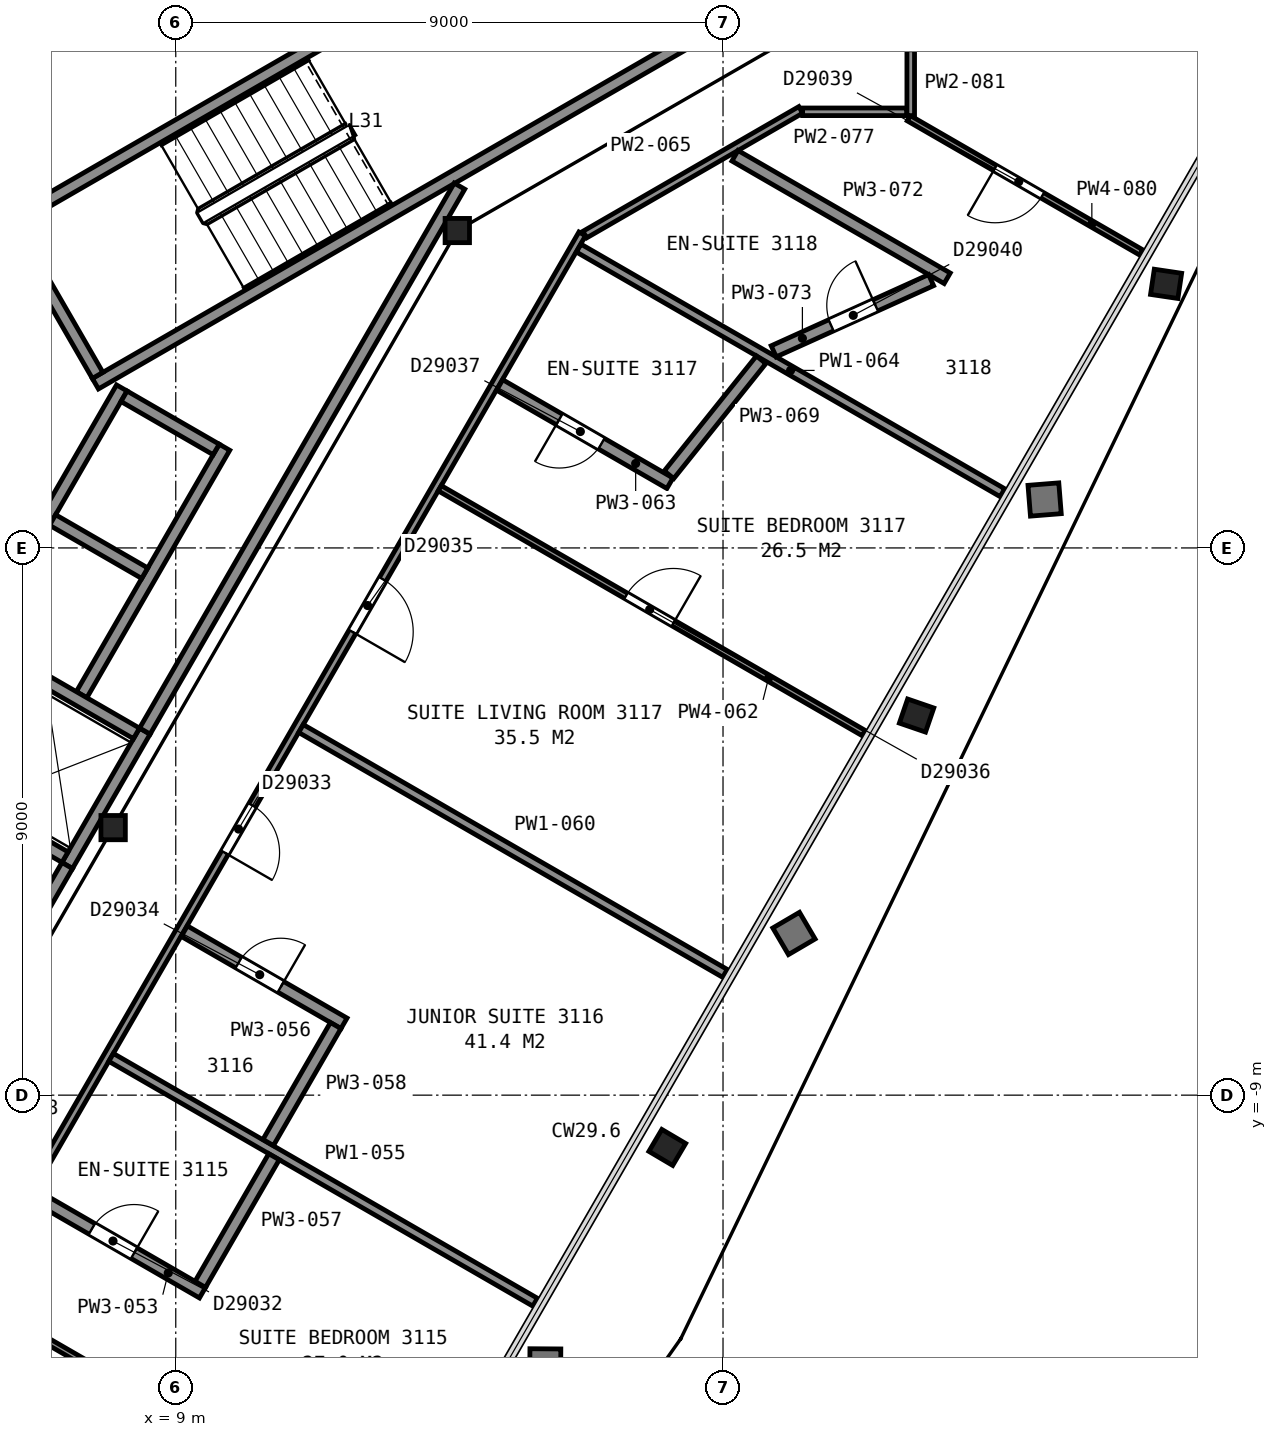
"""IFC4 building model, lengths in metres.
Left out: names, types, materials, properties, quantities, classifications, styles, units other than length and angle.
Written with IfcOpenShell. Run it as: python <this file> out.ifc"""

import sys

from ifc_helpers import new_model, si_unit, direction, frame, frame_2d, origin, origin_2d, place, context, subcontext, project, spatial, rectangle, i_section, extrude, element, fill, save


model = new_model("IFC4")
c1 = context("Model", 3, precision=1e-05, world=origin(), true_north=direction((0.0, 1.0)))
c2 = subcontext(c1, "Body", "Model", "MODEL_VIEW")
j1 = project(units=[si_unit("LENGTHUNIT", "METRE"), si_unit("PLANEANGLEUNIT", "RADIAN")], contexts=[c1])
p1 = place(None, origin())
s1 = spatial("IfcSite", under=j1, at=p1, CompositionType="ELEMENT")
p2 = place(p1, origin())
s2 = spatial("IfcBuilding", under=s1, at=p2, CompositionType="ELEMENT")
p3 = place(p2, frame((0.0, 0.0, 128.8)))
s3 = spatial("IfcBuildingStorey", under=s2, at=p3, CompositionType="ELEMENT", Elevation=128.8)
p4 = place(p3, frame((16.886, -9.743, 0.035), z_axis=(0.166257050151, -0.0981255896, 0.981188035975), x_axis=(-0.500024449769, -0.866009245638, -0.001880452815)))
e1 = element("IfcColumn", 1, at=p4, inside=s3, PredefinedType="COLUMN", context=c2, shape_type="SweptSolid", body=[
    extrude(i_section(OverallWidth=0.419, OverallDepth=0.455, WebThickness=0.042, FlangeThickness=0.068, FilletRadius=0.015, at=origin_2d()), origin(), (0.0, 0.0, 1.0), 3.598),
])
p5 = place(p3, frame((20.967, -2.683, 0.04), z_axis=(0.18265232026, -0.062676150134, 0.981177777015), x_axis=(-0.499535766842, -0.865472257466, 0.037706620133)))
e2 = element("IfcColumn", 2, at=p5, inside=s3, PredefinedType="COLUMN", context=c2, shape_type="SweptSolid", body=[
    extrude(i_section(OverallWidth=0.419, OverallDepth=0.455, WebThickness=0.042, FlangeThickness=0.068, FilletRadius=0.015, at=origin_2d()), origin(), (0.0, 0.0, 1.0), 3.588),
])
p6 = place(p3, frame((25.048, 4.379, 0.04), z_axis=(0.201275064079, -0.029946795971, 0.979076880531), x_axis=(-0.498664123801, -0.863447944319, 0.076103476176)))
e3 = element("IfcColumn", 3, at=p6, inside=s3, PredefinedType="COLUMN", context=c2, shape_type="SweptSolid", body=[
    extrude(i_section(OverallWidth=0.419, OverallDepth=0.455, WebThickness=0.042, FlangeThickness=0.068, FilletRadius=0.015, at=origin_2d()), origin(), (0.0, 0.0, 1.0), 3.595),
])
for number, where, z_axis, x_axis in (
    (4, (13.63, 5.22, 0.0), (0.0, 0.0, 1.0), (1.0, 0.0, 0.0)),
    (5, (7.97, -4.6, 0.0), (0.0, 0.0, 1.0), (1.0, 0.0, 0.0)),
):
    element("IfcColumn", number, at=place(p3, frame(where, z_axis=z_axis, x_axis=x_axis)), inside=s3, PredefinedType="COLUMN", context=c2, shape_type="SweptSolid", body=[
        extrude(i_section(OverallWidth=0.401, OverallDepth=0.399, WebThickness=0.025, FlangeThickness=0.04, FilletRadius=0.015, at=origin_2d()), origin(), (0.0, 0.0, 1.0), 3.6),
    ])
for number, where, z_axis, x_axis in (
    (6, (6.178, 5.299, 0.0), (0.0, 0.0, 1.0), (0.866, 0.5, 0.0)),
    (7, (7.678, 2.701, 0.0), (0.0, 0.0, 1.0), (0.866, 0.5, 0.0)),
):
    element("IfcWall", number, at=place(p3, frame(where, z_axis=z_axis, x_axis=x_axis)), inside=s3, PredefinedType="PARTITIONING", context=c2, shape_type="SweptSolid", body=[
        extrude(rectangle(XDim=12.0, YDim=0.2, at=frame_2d((6.0, 0.0))), origin(), (0.0, 0.0, 1.0), 3.35),
    ])
p7 = place(p3, frame((7.715, 2.838, 0.0), z_axis=(0.0, 0.0, 1.0), x_axis=(-0.500049511043, 0.865996816683, 0.0)))
e8 = element("IfcWall", 8, at=p7, inside=s3, PredefinedType="PARTITIONING", context=c2, shape_type="SweptSolid", body=[
    extrude(rectangle(XDim=2.8, YDim=0.2, at=frame_2d((1.4, 0.0))), origin(), (0.0, 0.0, 1.0), 3.35),
])
p8 = place(p3, frame((7.216, -5.222, 0.0), z_axis=(0.0, 0.0, 1.0), x_axis=(0.499990435942, 0.866030925526, 0.0)))
e9 = element("IfcWall", 9, at=p8, inside=s3, PredefinedType="PARTITIONING", context=c2, shape_type="SweptSolid", body=[
    extrude(rectangle(XDim=2.55, YDim=0.2, at=frame_2d((1.275, 0.0))), origin(), (0.0, 0.0, 1.0), 3.6),
])
p9 = place(p3, frame((7.451, -2.414, 0.0), z_axis=(0.0, 0.0, 1.0), x_axis=(0.500016218704, 0.866016039709, 0.0)))
e10 = element("IfcWall", 10, at=p9, inside=s3, PredefinedType="PARTITIONING", context=c2, shape_type="SweptSolid", body=[
    extrude(rectangle(XDim=4.7, YDim=0.2, at=frame_2d((2.35, 0.0))), origin(), (0.0, 0.0, 1.0), 3.6),
])
p10 = place(p3, frame((5.663, -1.612, 0.0), z_axis=(0.0, 0.0, 1.0), x_axis=(0.49998122708, 0.866036242063, 0.0)))
e11 = element("IfcWall", 11, at=p10, inside=s3, PredefinedType="PARTITIONING", context=c2, shape_type="SweptSolid", body=[
    extrude(rectangle(XDim=4.9, YDim=0.2, at=frame_2d((2.45, 0.0))), origin(), (0.0, 0.0, 1.0), 3.6),
])
p11 = place(p3, frame((9.665, 1.62, 0.0), z_axis=(0.0, 0.0, 1.0), x_axis=(-0.866002029911, 0.500040482552, 0.0)))
e12 = element("IfcWall", 12, at=p11, inside=s3, PredefinedType="PARTITIONING", context=c2, shape_type="SweptSolid", body=[
    extrude(rectangle(XDim=1.75, YDim=0.2, at=frame_2d((0.875, 0.0))), origin(), (0.0, 0.0, 1.0), 3.6),
])
p12 = place(p3, frame((8.49, -0.416, 0.0), z_axis=(0.0, 0.0, 1.0), x_axis=(-0.866036909293, 0.499980071345, 0.0)))
e13 = element("IfcWall", 13, at=p12, inside=s3, PredefinedType="PARTITIONING", context=c2, shape_type="SweptSolid", body=[
    extrude(rectangle(XDim=1.75, YDim=0.2, at=frame_2d((0.875, 0.0))), origin(), (0.0, 0.0, 1.0), 3.6),
])
p13 = place(p3, frame((8.354, -3.051, 0.0), z_axis=(0.0, 0.0, 1.0), x_axis=(-0.866060182126, 0.499939757307, 0.0)))
e14 = element("IfcWall", 14, at=p13, inside=s3, PredefinedType="PARTITIONING", context=c2, shape_type="SweptSolid", body=[
    extrude(rectangle(XDim=2.95, YDim=0.2, at=frame_2d((1.475, 0.0))), origin(), (0.0, 0.0, 1.0), 3.6),
])
p14 = place(p3, frame((7.179, -5.086, 0.0), z_axis=(0.0, 0.0, 1.0), x_axis=(-0.866036909293, 0.499980071345, 0.0)))
e15 = element("IfcWall", 15, at=p14, inside=s3, PredefinedType="PARTITIONING", context=c2, shape_type="SweptSolid", body=[
    extrude(rectangle(XDim=1.75, YDim=0.2, at=frame_2d((0.875, 0.0))), origin(), (0.0, 0.0, 1.0), 3.6),
])
p15 = place(p3, frame((5.906, -7.49, 0.0), z_axis=(0.0, 0.0, 1.0), x_axis=(0.500252727967, 0.865879442048, 0.0)))
e16 = element("IfcWall", 16, at=p15, inside=s3, PredefinedType="PARTITIONING", context=c2, shape_type="SweptSolid", body=[
    extrude(rectangle(XDim=2.617, YDim=0.2, at=frame_2d((1.309, 0.0))), origin(), (0.0, 0.0, 1.0), 3.35),
])
p16 = place(p3, frame((8.492, -3.012, 0.0), z_axis=(0.0, 0.0, 1.0), x_axis=(0.499972957231, 0.866041016371, 0.0)))
e17 = element("IfcWall", 17, at=p16, inside=s3, PredefinedType="PARTITIONING", context=c2, shape_type="SweptSolid", body=[
    extrude(rectangle(XDim=10.349, YDim=0.2, at=frame_2d((5.174, 0.0))), origin(), (0.0, 0.0, 1.0), 3.35),
])
p17 = place(p3, frame((15.684, 5.165, 0.0), z_axis=(0.0, 0.0, 1.0), x_axis=(-0.500027787016, -0.866009360349, 0.0)))
e18 = element("IfcWall", 18, at=p17, inside=s3, PredefinedType="PARTITIONING", context=c2, shape_type="SweptSolid", body=[
    extrude(rectangle(XDim=23.856, YDim=0.125, at=frame_2d((11.928, 0.0))), origin(), (0.0, 0.0, 1.0), 2.613),
])
p18 = place(p17, frame((21.493, 0.0, 0.0)))
e19 = element("IfcOpeningElement", 19, at=p18, cuts=e18, PredefinedType="OPENING", context=c2, shape_type="SweptSolid", body=[
    extrude(rectangle(XDim=1.0, YDim=2.1, at=frame_2d((0.5, 1.05))), frame((0.0, 0.073, 0.0), z_axis=(0.0, -1.0, 0.0), x_axis=(1.0, 0.0, 0.0)), (0.0, 0.0, 1.0), 0.145),
])
p19 = place(p17, frame((10.853, 0.0, 0.0)))
e20 = element("IfcOpeningElement", 20, at=p19, cuts=e18, PredefinedType="OPENING", context=c2, shape_type="SweptSolid", body=[
    extrude(rectangle(XDim=0.9, YDim=2.1, at=frame_2d((0.45, 1.05))), frame((0.0, 0.073, 0.0), z_axis=(0.0, -1.0, 0.0), x_axis=(1.0, 0.0, 0.0)), (0.0, 0.0, 1.0), 0.145),
])
p20 = place(p17, frame((6.558, 0.0, 0.0)))
e21 = element("IfcOpeningElement", 21, at=p20, cuts=e18, PredefinedType="OPENING", context=c2, shape_type="SweptSolid", body=[
    extrude(rectangle(XDim=1.0, YDim=2.1, at=frame_2d((0.5, 1.05))), frame((0.0, 0.073, 0.0), z_axis=(0.0, -1.0, 0.0), x_axis=(1.0, 0.0, 0.0)), (0.0, 0.0, 1.0), 0.145),
])
p21 = place(p3, frame((5.654, -12.331, 0.0), z_axis=(0.0, 0.0, 1.0), x_axis=(0.866051796338, -0.49995428397, 0.0)))
e22 = element("IfcWall", 22, at=p21, inside=s3, PredefinedType="PARTITIONING", context=c2, shape_type="SweptSolid", body=[
    extrude(rectangle(XDim=8.052, YDim=0.1, at=frame_2d((4.026, 0.0))), origin(), (0.0, 0.0, 1.0), 2.613),
])
p22 = place(p21, frame((3.538, 0.0, 0.0)))
e23 = element("IfcOpeningElement", 23, at=p22, cuts=e22, PredefinedType="OPENING", context=c2, shape_type="SweptSolid", body=[
    extrude(rectangle(XDim=0.9, YDim=2.1, at=frame_2d((0.45, 1.05))), frame((0.0, 0.06, 0.0), z_axis=(0.0, -1.0, 0.0), x_axis=(1.0, 0.0, 0.0)), (0.0, 0.0, 1.0), 0.12),
])
p23 = place(p3, frame((6.64, -10.633, 0.0), z_axis=(0.0, 0.0, 1.0), x_axis=(0.866022073929, -0.500005767435, 0.0)))
e24 = element("IfcWall", 24, at=p23, inside=s3, PredefinedType="PARTITIONING", context=c2, shape_type="SweptSolid", body=[
    extrude(rectangle(XDim=3.232, YDim=0.2, at=frame_2d((1.616, 0.0))), origin(), (0.0, 0.0, 1.0), 2.613),
])
p24 = place(p23, frame((1.133, 0.0, 0.0)))
e25 = element("IfcOpeningElement", 25, at=p24, cuts=e24, PredefinedType="OPENING", context=c2, shape_type="SweptSolid", body=[
    extrude(rectangle(XDim=0.8, YDim=2.1, at=frame_2d((0.4, 1.05))), frame((0.0, 0.11, 0.0), z_axis=(0.0, -1.0, 0.0), x_axis=(1.0, 0.0, 0.0)), (0.0, 0.0, 1.0), 0.22),
])
p25 = place(p3, frame((7.936, -8.379, 0.0), z_axis=(0.0, 0.0, 1.0), x_axis=(0.866044217767, -0.499967411811, 0.0)))
e26 = element("IfcWall", 26, at=p25, inside=s3, PredefinedType="PARTITIONING", context=c2, shape_type="SweptSolid", body=[
    extrude(rectangle(XDim=8.052, YDim=0.15, at=frame_2d((4.026, 0.0))), origin(), (0.0, 0.0, 1.0), 2.613),
])
p26 = place(p3, frame((11.767, -7.819, 0.0), z_axis=(0.0, 0.0, 1.0), x_axis=(-0.866009954834, 0.500026757412, 0.0)))
e27 = element("IfcWall", 27, at=p26, inside=s3, PredefinedType="PARTITIONING", context=c2, shape_type="SweptSolid", body=[
    extrude(rectangle(XDim=3.032, YDim=0.2, at=frame_2d((1.516, 0.0))), origin(), (0.0, 0.0, 1.0), 2.613),
])
p27 = place(p26, frame((1.2, 0.0, 0.0)))
e28 = element("IfcOpeningElement", 28, at=p27, cuts=e27, PredefinedType="OPENING", context=c2, shape_type="SweptSolid", body=[
    extrude(rectangle(XDim=0.8, YDim=2.1, at=frame_2d((0.4, 1.05))), frame((0.0, 0.11, 0.0), z_axis=(0.0, -1.0, 0.0), x_axis=(1.0, 0.0, 0.0)), (0.0, 0.0, 1.0), 0.22),
])
p28 = place(p3, frame((9.403, -12.112, 0.0), z_axis=(0.0, 0.0, 1.0), x_axis=(0.500103096288, 0.865965872932, 0.0)))
e29 = element("IfcWall", 29, at=p28, inside=s3, PredefinedType="PARTITIONING", context=c2, shape_type="SweptSolid", body=[
    extrude(rectangle(XDim=2.424, YDim=0.2, at=frame_2d((1.212, 0.0))), origin(), (0.0, 0.0, 1.0), 2.613),
])
p29 = place(p3, frame((10.52, -9.779, 0.0), z_axis=(0.0, 0.0, 1.0), x_axis=(0.499935013329, 0.866062920605, 0.0)))
e30 = element("IfcWall", 30, at=p29, inside=s3, PredefinedType="PARTITIONING", context=c2, shape_type="SweptSolid", body=[
    extrude(rectangle(XDim=2.22, YDim=0.2, at=frame_2d((1.11, 0.0))), origin(), (0.0, 0.0, 1.0), 2.613),
])
p30 = place(p3, frame((11.059, -2.97, 0.0), z_axis=(0.0, 0.0, 1.0), x_axis=(0.865968957472, -0.500097755139, 0.0)))
e31 = element("IfcWall", 31, at=p30, inside=s3, PredefinedType="PARTITIONING", context=c2, shape_type="SweptSolid", body=[
    extrude(rectangle(XDim=8.052, YDim=0.15, at=frame_2d((4.026, 0.0))), origin(), (0.0, 0.0, 1.0), 2.613),
])
p31 = place(p3, frame((13.341, 0.982, 0.0), z_axis=(0.0, 0.0, 1.0), x_axis=(0.865974505336, -0.500088148337, 0.0)))
e32 = element("IfcWall", 32, at=p31, inside=s3, PredefinedType="PARTITIONING", context=c2, shape_type="SweptSolid", body=[
    extrude(rectangle(XDim=8.052, YDim=0.1, at=frame_2d((4.026, 0.0))), origin(), (0.0, 0.0, 1.0), 2.613),
])
p32 = place(p31, frame((3.538, 0.0, 0.0)))
e33 = element("IfcOpeningElement", 33, at=p32, cuts=e32, PredefinedType="OPENING", context=c2, shape_type="SweptSolid", body=[
    extrude(rectangle(XDim=0.9, YDim=2.1, at=frame_2d((0.45, 1.05))), frame((0.0, 0.06, 0.0), z_axis=(0.0, -1.0, 0.0), x_axis=(1.0, 0.0, 0.0)), (0.0, 0.0, 1.0), 0.12),
])
p33 = place(p3, frame((14.326, 2.68, 0.0), z_axis=(0.0, 0.0, 1.0), x_axis=(0.86609757561, -0.499874973892, 0.0)))
e34 = element("IfcWall", 34, at=p33, inside=s3, PredefinedType="PARTITIONING", context=c2, shape_type="SweptSolid", body=[
    extrude(rectangle(XDim=3.233, YDim=0.2, at=frame_2d((1.617, 0.0))), origin(), (0.0, 0.0, 1.0), 2.613),
])
p34 = place(p33, frame((1.133, 0.0, 0.0)))
e35 = element("IfcOpeningElement", 35, at=p34, cuts=e34, PredefinedType="OPENING", context=c2, shape_type="SweptSolid", body=[
    extrude(rectangle(XDim=0.8, YDim=2.1, at=frame_2d((0.4, 1.05))), frame((0.0, 0.11, 0.0), z_axis=(0.0, -1.0, 0.0), x_axis=(1.0, 0.0, 0.0)), (0.0, 0.0, 1.0), 0.22),
])
p35 = place(p3, frame((15.626, 4.931, 0.0), z_axis=(0.0, 0.0, 1.0), x_axis=(0.866059795523, -0.49994042703, 0.0)))
e36 = element("IfcWall", 36, at=p35, inside=s3, PredefinedType="PARTITIONING", context=c2, shape_type="SweptSolid", body=[
    extrude(rectangle(XDim=8.047, YDim=0.15, at=frame_2d((4.024, 0.0))), origin(), (0.0, 0.0, 1.0), 2.613),
])
p36 = place(p3, frame((15.727, 5.154, 0.0), z_axis=(0.0, 0.0, 1.0), x_axis=(0.865992261418, 0.50005739987, 0.0)))
e37 = element("IfcWall", 37, at=p36, inside=s3, PredefinedType="PARTITIONING", context=c2, shape_type="SweptSolid", body=[
    extrude(rectangle(XDim=4.101, YDim=0.125, at=frame_2d((2.051, 0.0))), origin(), (0.0, 0.0, 1.0), 2.613),
])
p37 = place(p3, frame((17.112, 1.204, 0.0), z_axis=(0.0, 0.0, 1.0), x_axis=(0.625309237246, 0.780377061307, 0.0)))
e38 = element("IfcWall", 38, at=p37, inside=s3, PredefinedType="PARTITIONING", context=c2, shape_type="SweptSolid", body=[
    extrude(rectangle(XDim=2.423, YDim=0.2, at=frame_2d((1.211, 0.0))), origin(), (0.0, 0.0, 1.0), 2.613),
])
p38 = place(p3, frame((18.197, 6.45, 0.0), z_axis=(0.0, 0.0, 1.0), x_axis=(0.866031230052, -0.499989908473, 0.0)))
e39 = element("IfcWall", 39, at=p38, inside=s3, PredefinedType="PARTITIONING", context=c2, shape_type="SweptSolid", body=[
    extrude(rectangle(XDim=4.03, YDim=0.2, at=frame_2d((2.015, 0.0))), origin(), (0.0, 0.0, 1.0), 2.613),
])
p39 = place(p3, frame((18.833, 3.234, 0.0), z_axis=(0.0, 0.0, 1.0), x_axis=(0.911141723421, 0.412093144618, 0.0)))
e40 = element("IfcWall", 40, at=p39, inside=s3, PredefinedType="PARTITIONING", context=c2, shape_type="SweptSolid", body=[
    extrude(rectangle(XDim=2.841, YDim=0.2, at=frame_2d((1.421, 0.0))), origin(), (0.0, 0.0, 1.0), 2.613),
])
p40 = place(p39, frame((1.036, 0.0, 0.0)))
e41 = element("IfcOpeningElement", 41, at=p40, cuts=e40, PredefinedType="OPENING", context=c2, shape_type="SweptSolid", body=[
    extrude(rectangle(XDim=0.8, YDim=2.1, at=frame_2d((0.4, 1.05))), frame((0.0, 0.11, 0.0), z_axis=(0.0, -1.0, 0.0), x_axis=(1.0, 0.0, 0.0)), (0.0, 0.0, 1.0), 0.22),
])
p41 = place(p3, frame((19.309, 7.173, 0.0), z_axis=(0.0, 0.0, 1.0), x_axis=(1.0, 0.0, 0.0)))
e42 = element("IfcWall", 42, at=p41, inside=s3, PredefinedType="PARTITIONING", context=c2, shape_type="SweptSolid", body=[
    extrude(rectangle(XDim=1.713, YDim=0.125, at=frame_2d((0.856, 0.0))), origin(), (0.0, 0.0, 1.0), 2.613),
])
p42 = place(p3, frame((24.878, 4.86, 0.0), z_axis=(0.0, 0.0, 1.0), x_axis=(-0.866005058873, 0.500035236765, 0.0)))
e43 = element("IfcWall", 43, at=p42, inside=s3, PredefinedType="PARTITIONING", context=c2, shape_type="SweptSolid", body=[
    extrude(rectangle(XDim=4.414, YDim=0.1, at=frame_2d((2.207, 0.0))), origin(), (0.0, 0.0, 1.0), 2.613),
])
p43 = place(p42, frame((1.876, 0.0, 0.0)))
e44 = element("IfcOpeningElement", 44, at=p43, cuts=e43, PredefinedType="OPENING", context=c2, shape_type="SweptSolid", body=[
    extrude(rectangle(XDim=0.9, YDim=2.1, at=frame_2d((0.45, 1.05))), frame((0.0, 0.06, 0.0), z_axis=(0.0, -1.0, 0.0), x_axis=(1.0, 0.0, 0.0)), (0.0, 0.0, 1.0), 0.12),
])
p44 = place(p3, frame((21.087, 10.209, 0.0), z_axis=(0.0, 0.0, 1.0), x_axis=(0.0, -1.0, 0.0)))
e45 = element("IfcWall", 45, at=p44, inside=s3, PredefinedType="PARTITIONING", context=c2, shape_type="SweptSolid", body=[
    extrude(rectangle(XDim=3.099, YDim=0.125, at=frame_2d((1.549, 0.0))), origin(), (0.0, 0.0, 1.0), 2.613),
])
p45 = place(p44, frame((1.037, 0.0, 0.0)))
e46 = element("IfcOpeningElement", 46, at=p45, cuts=e45, PredefinedType="OPENING", context=c2, shape_type="SweptSolid", body=[
    extrude(rectangle(XDim=1.0, YDim=2.1, at=frame_2d((0.5, 1.05))), frame((0.0, 0.073, 0.0), z_axis=(0.0, -1.0, 0.0), x_axis=(1.0, 0.0, 0.0)), (0.0, 0.0, 1.0), 0.145),
])
p46 = place(p19, origin())
e47 = element("IfcDoor", 47, at=p46, inside=s3, OperationType="SINGLE_SWING_RIGHT", PredefinedType="DOOR", context=c2, shape_type="SweptSolid", body=[
    extrude(rectangle(XDim=0.9, YDim=2.1, at=frame_2d((0.45, 1.05))), frame((0.0, 0.025, 0.0), z_axis=(0.0, -1.0, 0.0), x_axis=(1.0, 0.0, 0.0)), (0.0, 0.0, 1.0), 0.05),
])
fill(e20, e47)
p47 = place(p20, origin())
e48 = element("IfcDoor", 48, at=p47, inside=s3, OperationType="SINGLE_SWING_RIGHT", PredefinedType="DOOR", context=c2, shape_type="SweptSolid", body=[
    extrude(rectangle(XDim=1.0, YDim=2.1, at=frame_2d((0.5, 1.05))), frame((0.0, 0.025, 0.0), z_axis=(0.0, -1.0, 0.0), x_axis=(1.0, 0.0, 0.0)), (0.0, 0.0, 1.0), 0.05),
])
fill(e21, e48)
p48 = place(p24, origin())
e49 = element("IfcDoor", 49, at=p48, inside=s3, OperationType="SINGLE_SWING_RIGHT", PredefinedType="DOOR", context=c2, shape_type="SweptSolid", body=[
    extrude(rectangle(XDim=0.8, YDim=2.1, at=frame_2d((0.4, 1.05))), frame((0.0, 0.025, 0.0), z_axis=(0.0, -1.0, 0.0), x_axis=(1.0, 0.0, 0.0)), (0.0, 0.0, 1.0), 0.05),
])
fill(e25, e49)
p49 = place(p27, origin())
e50 = element("IfcDoor", 50, at=p49, inside=s3, OperationType="SINGLE_SWING_LEFT", PredefinedType="DOOR", context=c2, shape_type="SweptSolid", body=[
    extrude(rectangle(XDim=0.8, YDim=2.1, at=frame_2d((0.4, 1.05))), frame((0.0, 0.025, 0.0), z_axis=(0.0, -1.0, 0.0), x_axis=(1.0, 0.0, 0.0)), (0.0, 0.0, 1.0), 0.05),
])
fill(e28, e50)
p50 = place(p32, origin())
e51 = element("IfcDoor", 51, at=p50, inside=s3, OperationType="SINGLE_SWING_RIGHT", PredefinedType="DOOR", context=c2, shape_type="SweptSolid", body=[
    extrude(rectangle(XDim=0.9, YDim=2.1, at=frame_2d((0.45, 1.05))), frame((0.0, 0.025, 0.0), z_axis=(0.0, -1.0, 0.0), x_axis=(1.0, 0.0, 0.0)), (0.0, 0.0, 1.0), 0.05),
])
fill(e33, e51)
p51 = place(p34, origin())
e52 = element("IfcDoor", 52, at=p51, inside=s3, OperationType="SINGLE_SWING_LEFT", PredefinedType="DOOR", context=c2, shape_type="SweptSolid", body=[
    extrude(rectangle(XDim=0.8, YDim=2.1, at=frame_2d((0.4, 1.05))), frame((0.0, 0.025, 0.0), z_axis=(0.0, -1.0, 0.0), x_axis=(1.0, 0.0, 0.0)), (0.0, 0.0, 1.0), 0.05),
])
fill(e35, e52)
p52 = place(p40, origin())
e53 = element("IfcDoor", 53, at=p52, inside=s3, OperationType="SINGLE_SWING_RIGHT", PredefinedType="DOOR", context=c2, shape_type="SweptSolid", body=[
    extrude(rectangle(XDim=0.8, YDim=2.1, at=frame_2d((0.4, 1.05))), frame((0.0, 0.025, 0.0), z_axis=(0.0, -1.0, 0.0), x_axis=(1.0, 0.0, 0.0)), (0.0, 0.0, 1.0), 0.05),
])
fill(e41, e53)
p53 = place(p43, origin())
e54 = element("IfcDoor", 54, at=p53, inside=s3, OperationType="SINGLE_SWING_RIGHT", PredefinedType="DOOR", context=c2, shape_type="SweptSolid", body=[
    extrude(rectangle(XDim=0.9, YDim=2.1, at=frame_2d((0.45, 1.05))), frame((0.0, 0.025, 0.0), z_axis=(0.0, -1.0, 0.0), x_axis=(1.0, 0.0, 0.0)), (0.0, 0.0, 1.0), 0.05),
])
fill(e44, e54)
save(model, sys.argv[1])
